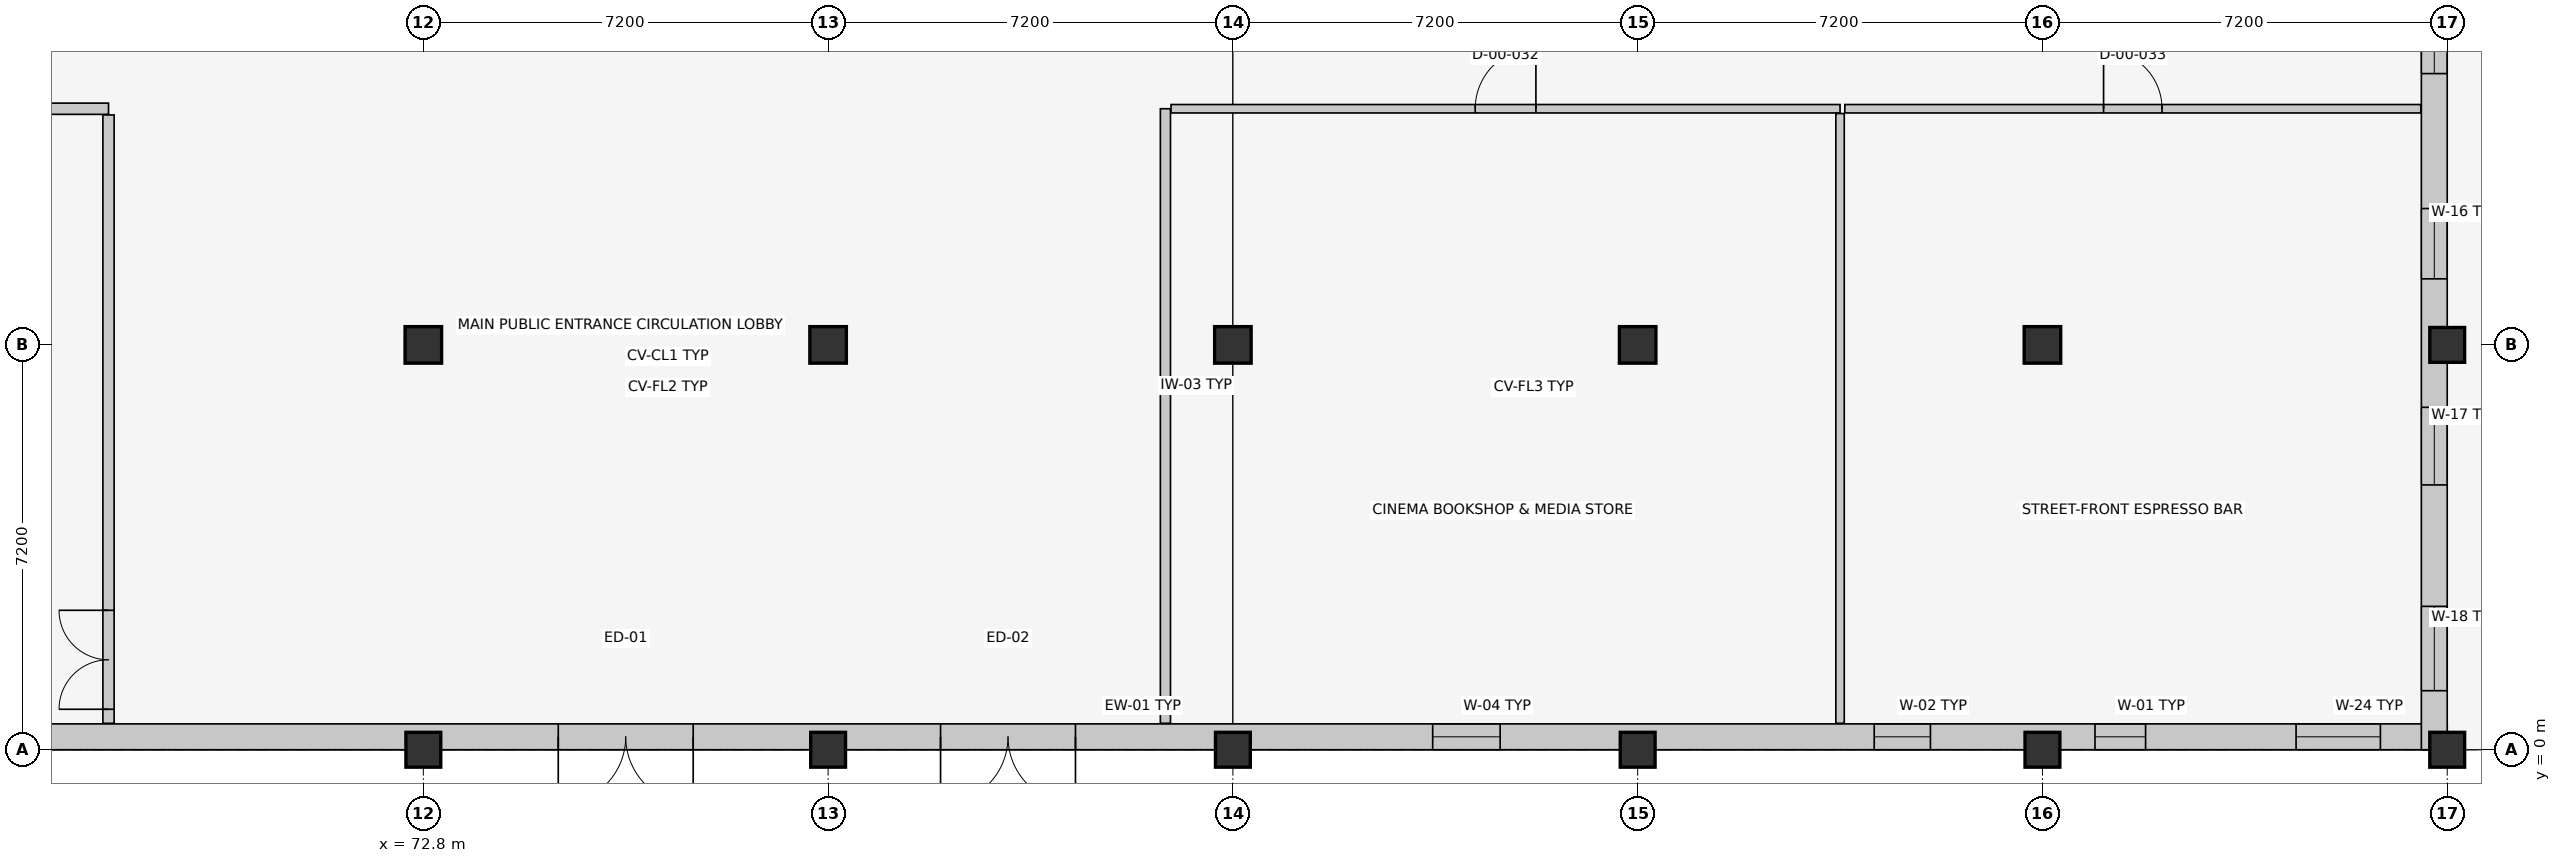
"""IFC4 building model, lengths in metres.
Left out: names, types, materials, properties, quantities, classifications, styles, units other than length and angle.
Written with IfcOpenShell. Run it as: python <this file> out.ifc"""

import sys

from ifc_helpers import new_model, si_unit, direction, frame, frame_2d, origin, origin_2d, place, context, subcontext, project, spatial, rectangle, extrude, element, fill, save


model = new_model("IFC4")
c1 = context("Model", 3, precision=1e-05, world=origin(), true_north=direction((0.0, 1.0)))
c2 = subcontext(c1, "Body", "Model", "MODEL_VIEW")
j1 = project(units=[si_unit("LENGTHUNIT", "METRE"), si_unit("PLANEANGLEUNIT", "RADIAN")], contexts=[c1])
p1 = place(None, origin())
s1 = spatial("IfcSite", under=j1, at=p1, CompositionType="ELEMENT")
p2 = place(p1, origin())
s2 = spatial("IfcBuilding", under=s1, at=p2, CompositionType="ELEMENT")
p3 = place(p2, origin())
s3 = spatial("IfcBuildingStorey", under=s2, at=p3, CompositionType="ELEMENT", Elevation=0.0)
p4 = place(p3, frame((72.8, 0.0, 0.0), z_axis=(0.0, 0.0, 1.0), x_axis=(1.0, 0.0, 0.0)))
e1 = element("IfcColumn", 1, at=p4, inside=s3, PredefinedType="COLUMN", context=c2, shape_type="SweptSolid", body=[
    extrude(rectangle(XDim=0.62, YDim=0.62, at=origin_2d()), origin(), (0.0, 0.0, 1.0), 5.4),
])
p5 = place(p3, frame((72.8, 7.2, 0.0), z_axis=(0.0, 0.0, 1.0), x_axis=(1.0, 0.0, 0.0)))
e2 = element("IfcColumn", 2, at=p5, inside=s3, PredefinedType="COLUMN", context=c2, shape_type="SweptSolid", body=[
    extrude(rectangle(XDim=0.65, YDim=0.65, at=origin_2d()), origin(), (0.0, 0.0, 1.0), 5.4),
])
p6 = place(p3, frame((80.0, 0.0, 0.0), z_axis=(0.0, 0.0, 1.0), x_axis=(1.0, 0.0, 0.0)))
e3 = element("IfcColumn", 3, at=p6, inside=s3, PredefinedType="COLUMN", context=c2, shape_type="SweptSolid", body=[
    extrude(rectangle(XDim=0.62, YDim=0.62, at=origin_2d()), origin(), (0.0, 0.0, 1.0), 5.4),
])
p7 = place(p3, frame((80.0, 7.2, 0.0), z_axis=(0.0, 0.0, 1.0), x_axis=(1.0, 0.0, 0.0)))
e4 = element("IfcColumn", 4, at=p7, inside=s3, PredefinedType="COLUMN", context=c2, shape_type="SweptSolid", body=[
    extrude(rectangle(XDim=0.65, YDim=0.65, at=origin_2d()), origin(), (0.0, 0.0, 1.0), 5.4),
])
p8 = place(p3, frame((87.2, 0.0, 0.0), z_axis=(0.0, 0.0, 1.0), x_axis=(1.0, 0.0, 0.0)))
e5 = element("IfcColumn", 5, at=p8, inside=s3, PredefinedType="COLUMN", context=c2, shape_type="SweptSolid", body=[
    extrude(rectangle(XDim=0.62, YDim=0.62, at=origin_2d()), origin(), (0.0, 0.0, 1.0), 5.4),
])
p9 = place(p3, frame((87.2, 7.2, 0.0), z_axis=(0.0, 0.0, 1.0), x_axis=(1.0, 0.0, 0.0)))
e6 = element("IfcColumn", 6, at=p9, inside=s3, PredefinedType="COLUMN", context=c2, shape_type="SweptSolid", body=[
    extrude(rectangle(XDim=0.65, YDim=0.65, at=origin_2d()), origin(), (0.0, 0.0, 1.0), 5.4),
])
p10 = place(p3, frame((94.4, 0.0, 0.0), z_axis=(0.0, 0.0, 1.0), x_axis=(1.0, 0.0, 0.0)))
e7 = element("IfcColumn", 7, at=p10, inside=s3, PredefinedType="COLUMN", context=c2, shape_type="SweptSolid", body=[
    extrude(rectangle(XDim=0.62, YDim=0.62, at=origin_2d()), origin(), (0.0, 0.0, 1.0), 5.4),
])
p11 = place(p3, frame((94.4, 7.2, 0.0), z_axis=(0.0, 0.0, 1.0), x_axis=(1.0, 0.0, 0.0)))
e8 = element("IfcColumn", 8, at=p11, inside=s3, PredefinedType="COLUMN", context=c2, shape_type="SweptSolid", body=[
    extrude(rectangle(XDim=0.65, YDim=0.65, at=origin_2d()), origin(), (0.0, 0.0, 1.0), 5.4),
])
p12 = place(p3, frame((101.6, 0.0, 0.0), z_axis=(0.0, 0.0, 1.0), x_axis=(1.0, 0.0, 0.0)))
e9 = element("IfcColumn", 9, at=p12, inside=s3, PredefinedType="COLUMN", context=c2, shape_type="SweptSolid", body=[
    extrude(rectangle(XDim=0.62, YDim=0.62, at=origin_2d()), origin(), (0.0, 0.0, 1.0), 5.4),
])
p13 = place(p3, frame((101.6, 7.2, 0.0), z_axis=(0.0, 0.0, 1.0), x_axis=(1.0, 0.0, 0.0)))
e10 = element("IfcColumn", 10, at=p13, inside=s3, PredefinedType="COLUMN", context=c2, shape_type="SweptSolid", body=[
    extrude(rectangle(XDim=0.65, YDim=0.65, at=origin_2d()), origin(), (0.0, 0.0, 1.0), 5.4),
])
for number, where, z_axis, x_axis in (
    (11, (108.8, 0.0, 0.0), (0.0, 0.0, 1.0), (1.0, 0.0, 0.0)),
    (12, (108.8, 7.2, 0.0), (0.0, 0.0, 1.0), (1.0, 0.0, 0.0)),
):
    element("IfcColumn", number, at=place(p3, frame(where, z_axis=z_axis, x_axis=x_axis)), inside=s3, PredefinedType="COLUMN", context=c2, shape_type="SweptSolid", body=[
        extrude(rectangle(XDim=0.62, YDim=0.62, at=origin_2d()), origin(), (0.0, 0.0, 1.0), 5.4),
    ])
p14 = place(p3, frame((108.8, 0.23, 0.0), z_axis=(0.0, 0.0, 1.0), x_axis=(-1.0, 0.0, 0.0)))
e13 = element("IfcWall", 13, at=p14, inside=s3, PredefinedType="SOLIDWALL", context=c2, shape_type="SweptSolid", body=[
    extrude(rectangle(XDim=50.4, YDim=0.46, at=frame_2d((25.2, 0.0))), origin(), (0.0, 0.0, 1.0), 4.445),
])
p15 = place(p14, frame((31.2, 0.0, 0.0)))
e14 = element("IfcOpeningElement", 14, at=p15, cuts=e13, PredefinedType="OPENING", context=c2, shape_type="SweptSolid", body=[
    extrude(rectangle(XDim=2.4, YDim=2.4, at=frame_2d((1.2, 1.2))), frame((0.0, 0.242, 0.0), z_axis=(0.0, -1.0, 0.0), x_axis=(1.0, 0.0, 0.0)), (0.0, 0.0, 1.0), 0.484),
])
p16 = place(p14, frame((24.4, 0.0, 0.0)))
e15 = element("IfcOpeningElement", 15, at=p16, cuts=e13, PredefinedType="OPENING", context=c2, shape_type="SweptSolid", body=[
    extrude(rectangle(XDim=2.4, YDim=2.4, at=frame_2d((1.2, 1.2))), frame((0.0, 0.242, 0.0), z_axis=(0.0, -1.0, 0.0), x_axis=(1.0, 0.0, 0.0)), (0.0, 0.0, 1.0), 0.484),
])
p17 = place(p14, frame((1.188, 0.0, 0.9)))
e16 = element("IfcOpeningElement", 16, at=p17, cuts=e13, PredefinedType="OPENING", context=c2, shape_type="SweptSolid", body=[
    extrude(rectangle(XDim=1.5, YDim=1.75, at=frame_2d((0.75, 0.875))), frame((0.0, 0.242, 0.0), z_axis=(0.0, -1.0, 0.0), x_axis=(1.0, 0.0, 0.0)), (0.0, 0.0, 1.0), 0.484),
])
p18 = place(p14, frame((5.365, 0.0, 0.9)))
e17 = element("IfcOpeningElement", 17, at=p18, cuts=e13, PredefinedType="OPENING", context=c2, shape_type="SweptSolid", body=[
    extrude(rectangle(XDim=0.9, YDim=1.35, at=frame_2d((0.45, 0.675))), frame((0.0, 0.242, 0.0), z_axis=(0.0, -1.0, 0.0), x_axis=(1.0, 0.0, 0.0)), (0.0, 0.0, 1.0), 0.484),
])
p19 = place(p14, frame((9.192, 0.0, 0.9)))
e18 = element("IfcOpeningElement", 18, at=p19, cuts=e13, PredefinedType="OPENING", context=c2, shape_type="SweptSolid", body=[
    extrude(rectangle(XDim=1.0, YDim=1.35, at=frame_2d((0.5, 0.675))), frame((0.0, 0.242, 0.0), z_axis=(0.0, -1.0, 0.0), x_axis=(1.0, 0.0, 0.0)), (0.0, 0.0, 1.0), 0.484),
])
p20 = place(p14, frame((16.846, 0.0, 0.9)))
e19 = element("IfcOpeningElement", 19, at=p20, cuts=e13, PredefinedType="OPENING", context=c2, shape_type="SweptSolid", body=[
    extrude(rectangle(XDim=1.2, YDim=1.35, at=frame_2d((0.6, 0.675))), frame((0.0, 0.242, 0.0), z_axis=(0.0, -1.0, 0.0), x_axis=(1.0, 0.0, 0.0)), (0.0, 0.0, 1.0), 0.484),
])
p21 = place(p14, frame((47.737, 0.0, 0.9)))
e20 = element("IfcOpeningElement", 20, at=p21, cuts=e13, PredefinedType="OPENING", context=c2, shape_type="SweptSolid", body=[
    extrude(rectangle(XDim=1.45, YDim=1.45, at=frame_2d((0.725, 0.725))), frame((0.0, 0.242, 0.0), z_axis=(0.0, -1.0, 0.0), x_axis=(1.0, 0.0, 0.0)), (0.0, 0.0, 1.0), 0.484),
])
p22 = place(p3, frame((108.57, 21.6, 0.0), z_axis=(0.0, 0.0, 1.0), x_axis=(0.0, -1.0, 0.0)))
e21 = element("IfcWall", 21, at=p22, inside=s3, PredefinedType="SOLIDWALL", context=c2, shape_type="SweptSolid", body=[
    extrude(rectangle(XDim=21.6, YDim=0.46, at=frame_2d((10.8, 0.0))), origin(), (0.0, 0.0, 1.0), 4.545),
])
p23 = place(p22, frame((1.35, 0.0, 0.9)))
e22 = element("IfcOpeningElement", 22, at=p23, cuts=e21, PredefinedType="OPENING", context=c2, shape_type="SweptSolid", body=[
    extrude(rectangle(XDim=0.9, YDim=1.6, at=frame_2d((0.45, 0.8))), frame((0.0, 0.242, 0.0), z_axis=(0.0, -1.0, 0.0), x_axis=(1.0, 0.0, 0.0)), (0.0, 0.0, 1.0), 0.484),
])
p24 = place(p22, frame((4.875, 0.0, 0.9)))
e23 = element("IfcOpeningElement", 23, at=p24, cuts=e21, PredefinedType="OPENING", context=c2, shape_type="SweptSolid", body=[
    extrude(rectangle(XDim=1.05, YDim=1.6, at=frame_2d((0.525, 0.8))), frame((0.0, 0.242, 0.0), z_axis=(0.0, -1.0, 0.0), x_axis=(1.0, 0.0, 0.0)), (0.0, 0.0, 1.0), 0.484),
])
p25 = place(p22, frame((8.425, 0.0, 0.9)))
e24 = element("IfcOpeningElement", 24, at=p25, cuts=e21, PredefinedType="OPENING", context=c2, shape_type="SweptSolid", body=[
    extrude(rectangle(XDim=1.15, YDim=1.6, at=frame_2d((0.575, 0.8))), frame((0.0, 0.242, 0.0), z_axis=(0.0, -1.0, 0.0), x_axis=(1.0, 0.0, 0.0)), (0.0, 0.0, 1.0), 0.484),
])
p26 = place(p22, frame((11.975, 0.0, 0.9)))
e25 = element("IfcOpeningElement", 25, at=p26, cuts=e21, PredefinedType="OPENING", context=c2, shape_type="SweptSolid", body=[
    extrude(rectangle(XDim=1.25, YDim=1.6, at=frame_2d((0.625, 0.8))), frame((0.0, 0.242, 0.0), z_axis=(0.0, -1.0, 0.0), x_axis=(1.0, 0.0, 0.0)), (0.0, 0.0, 1.0), 0.484),
])
p27 = place(p22, frame((15.51, 0.0, 0.9)))
e26 = element("IfcOpeningElement", 26, at=p27, cuts=e21, PredefinedType="OPENING", context=c2, shape_type="SweptSolid", body=[
    extrude(rectangle(XDim=1.38, YDim=1.6, at=frame_2d((0.69, 0.8))), frame((0.0, 0.242, 0.0), z_axis=(0.0, -1.0, 0.0), x_axis=(1.0, 0.0, 0.0)), (0.0, 0.0, 1.0), 0.484),
])
p28 = place(p22, frame((19.05, 0.0, 0.9)))
e27 = element("IfcOpeningElement", 27, at=p28, cuts=e21, PredefinedType="OPENING", context=c2, shape_type="SweptSolid", body=[
    extrude(rectangle(XDim=1.5, YDim=1.6, at=frame_2d((0.75, 0.8))), frame((0.0, 0.242, 0.0), z_axis=(0.0, -1.0, 0.0), x_axis=(1.0, 0.0, 0.0)), (0.0, 0.0, 1.0), 0.484),
])
p29 = place(p3, frame((58.87, 11.4, 0.0), z_axis=(0.0, 0.0, 1.0), x_axis=(1.0, 0.0, 0.0)))
e28 = element("IfcWall", 28, at=p29, inside=s3, PredefinedType="PARTITIONING", context=c2, shape_type="SweptSolid", body=[
    extrude(rectangle(XDim=8.33, YDim=0.2, at=frame_2d((4.165, 0.0))), origin(), (0.0, 0.0, 1.0), 5.15),
])
p30 = place(p3, frame((67.2, 0.47, 0.0), z_axis=(0.0, 0.0, 1.0), x_axis=(0.0, 1.0, 0.0)))
e29 = element("IfcWall", 29, at=p30, inside=s3, PredefinedType="PARTITIONING", context=c2, shape_type="SweptSolid", body=[
    extrude(rectangle(XDim=10.82, YDim=0.2, at=frame_2d((5.41, 0.0))), origin(), (0.0, 0.0, 1.0), 5.15),
])
p31 = place(p30, frame((0.25, 0.0, 0.0)))
e30 = element("IfcOpeningElement", 30, at=p31, cuts=e29, PredefinedType="OPENING", context=c2, shape_type="SweptSolid", body=[
    extrude(rectangle(XDim=1.76, YDim=2.3, at=frame_2d((0.88, 1.15))), frame((0.0, 0.112, 0.0), z_axis=(0.0, -1.0, 0.0), x_axis=(1.0, 0.0, 0.0)), (0.0, 0.0, 1.0), 0.224),
])
p32 = place(p3, frame((86.0, 0.47, 0.0), z_axis=(0.0, 0.0, 1.0), x_axis=(0.0, 1.0, 0.0)))
e31 = element("IfcWall", 31, at=p32, inside=s3, PredefinedType="PARTITIONING", context=c2, shape_type="SweptSolid", body=[
    extrude(rectangle(XDim=10.93, YDim=0.18, at=frame_2d((5.465, 0.0))), origin(), (0.0, 0.0, 1.0), 5.15),
])
p33 = place(p3, frame((86.1, 11.4, 0.0), z_axis=(0.0, 0.0, 1.0), x_axis=(1.0, 0.0, 0.0)))
e32 = element("IfcWall", 32, at=p33, inside=s3, PredefinedType="PARTITIONING", context=c2, shape_type="SweptSolid", body=[
    extrude(rectangle(XDim=11.9, YDim=0.15, at=frame_2d((5.95, 0.0))), origin(), (0.0, 0.0, 1.0), 5.15),
])
p34 = place(p33, frame((5.41, 0.0, 0.0)))
e33 = element("IfcOpeningElement", 33, at=p34, cuts=e32, PredefinedType="OPENING", context=c2, shape_type="SweptSolid", body=[
    extrude(rectangle(XDim=1.08, YDim=2.15, at=frame_2d((0.54, 1.075))), frame((0.0, 0.087, 0.0), z_axis=(0.0, -1.0, 0.0), x_axis=(1.0, 0.0, 0.0)), (0.0, 0.0, 1.0), 0.174),
])
p35 = place(p3, frame((98.0, 0.47, 0.0), z_axis=(0.0, 0.0, 1.0), x_axis=(0.0, 1.0, 0.0)))
e34 = element("IfcWall", 34, at=p35, inside=s3, PredefinedType="PARTITIONING", context=c2, shape_type="SweptSolid", body=[
    extrude(rectangle(XDim=10.845, YDim=0.15, at=frame_2d((5.422, 0.0))), origin(), (0.0, 0.0, 1.0), 4.575),
])
p36 = place(p3, frame((98.085, 11.4, 0.0), z_axis=(0.0, 0.0, 1.0), x_axis=(1.0, 0.0, 0.0)))
e35 = element("IfcWall", 35, at=p36, inside=s3, PredefinedType="PARTITIONING", context=c2, shape_type="SweptSolid", body=[
    extrude(rectangle(XDim=10.245, YDim=0.15, at=frame_2d((5.123, 0.0))), origin(), (0.0, 0.0, 1.0), 5.15),
])
p37 = place(p36, frame((4.603, 0.0, 0.0)))
e36 = element("IfcOpeningElement", 36, at=p37, cuts=e35, PredefinedType="OPENING", context=c2, shape_type="SweptSolid", body=[
    extrude(rectangle(XDim=1.04, YDim=2.15, at=frame_2d((0.52, 1.075))), frame((0.0, 0.087, 0.0), z_axis=(0.0, -1.0, 0.0), x_axis=(1.0, 0.0, 0.0)), (0.0, 0.0, 1.0), 0.174),
])
p38 = place(p15, origin())
e37 = element("IfcDoor", 37, at=p38, inside=s3, OperationType="DOUBLE_DOOR_SINGLE_SWING", PredefinedType="DOOR", context=c2, shape_type="SweptSolid", body=[
    extrude(rectangle(XDim=2.4, YDim=2.4, at=frame_2d((1.2, 1.2))), frame((0.0, 0.025, 0.0), z_axis=(0.0, -1.0, 0.0), x_axis=(1.0, 0.0, 0.0)), (0.0, 0.0, 1.0), 0.05),
])
fill(e14, e37)
p39 = place(p16, origin())
e38 = element("IfcDoor", 38, at=p39, inside=s3, OperationType="DOUBLE_DOOR_SINGLE_SWING", PredefinedType="DOOR", context=c2, shape_type="SweptSolid", body=[
    extrude(rectangle(XDim=2.4, YDim=2.4, at=frame_2d((1.2, 1.2))), frame((0.0, 0.025, 0.0), z_axis=(0.0, -1.0, 0.0), x_axis=(1.0, 0.0, 0.0)), (0.0, 0.0, 1.0), 0.05),
])
fill(e15, e38)
p40 = place(p17, origin())
e39 = element("IfcWindow", 39, at=p40, inside=s3, PartitioningType="SINGLE_PANEL", PredefinedType="WINDOW", context=c2, shape_type="SweptSolid", body=[
    extrude(rectangle(XDim=1.5, YDim=1.75, at=frame_2d((0.75, 0.875))), frame((0.0, 0.03, 0.0), z_axis=(0.0, -1.0, 0.0), x_axis=(1.0, 0.0, 0.0)), (0.0, 0.0, 1.0), 0.06),
])
fill(e16, e39)
p41 = place(p18, origin())
e40 = element("IfcWindow", 40, at=p41, inside=s3, PartitioningType="SINGLE_PANEL", PredefinedType="WINDOW", context=c2, shape_type="SweptSolid", body=[
    extrude(rectangle(XDim=0.9, YDim=1.35, at=frame_2d((0.45, 0.675))), frame((0.0, 0.03, 0.0), z_axis=(0.0, -1.0, 0.0), x_axis=(1.0, 0.0, 0.0)), (0.0, 0.0, 1.0), 0.06),
])
fill(e17, e40)
p42 = place(p19, origin())
e41 = element("IfcWindow", 41, at=p42, inside=s3, PartitioningType="SINGLE_PANEL", PredefinedType="WINDOW", context=c2, shape_type="SweptSolid", body=[
    extrude(rectangle(XDim=1.0, YDim=1.35, at=frame_2d((0.5, 0.675))), frame((0.0, 0.03, 0.0), z_axis=(0.0, -1.0, 0.0), x_axis=(1.0, 0.0, 0.0)), (0.0, 0.0, 1.0), 0.06),
])
fill(e18, e41)
p43 = place(p20, origin())
e42 = element("IfcWindow", 42, at=p43, inside=s3, PartitioningType="SINGLE_PANEL", PredefinedType="WINDOW", context=c2, shape_type="SweptSolid", body=[
    extrude(rectangle(XDim=1.2, YDim=1.35, at=frame_2d((0.6, 0.675))), frame((0.0, 0.03, 0.0), z_axis=(0.0, -1.0, 0.0), x_axis=(1.0, 0.0, 0.0)), (0.0, 0.0, 1.0), 0.06),
])
fill(e19, e42)
p44 = place(p25, origin())
e43 = element("IfcWindow", 43, at=p44, inside=s3, PartitioningType="SINGLE_PANEL", PredefinedType="WINDOW", context=c2, shape_type="SweptSolid", body=[
    extrude(rectangle(XDim=1.15, YDim=1.6, at=frame_2d((0.575, 0.8))), frame((0.0, 0.03, 0.0), z_axis=(0.0, -1.0, 0.0), x_axis=(1.0, 0.0, 0.0)), (0.0, 0.0, 1.0), 0.06),
])
fill(e24, e43)
p45 = place(p26, origin())
e44 = element("IfcWindow", 44, at=p45, inside=s3, PartitioningType="SINGLE_PANEL", PredefinedType="WINDOW", context=c2, shape_type="SweptSolid", body=[
    extrude(rectangle(XDim=1.25, YDim=1.6, at=frame_2d((0.625, 0.8))), frame((0.0, 0.03, 0.0), z_axis=(0.0, -1.0, 0.0), x_axis=(1.0, 0.0, 0.0)), (0.0, 0.0, 1.0), 0.06),
])
fill(e25, e44)
p46 = place(p27, origin())
e45 = element("IfcWindow", 45, at=p46, inside=s3, PartitioningType="SINGLE_PANEL", PredefinedType="WINDOW", context=c2, shape_type="SweptSolid", body=[
    extrude(rectangle(XDim=1.38, YDim=1.6, at=frame_2d((0.69, 0.8))), frame((0.0, 0.03, 0.0), z_axis=(0.0, -1.0, 0.0), x_axis=(1.0, 0.0, 0.0)), (0.0, 0.0, 1.0), 0.06),
])
fill(e26, e45)
p47 = place(p28, origin())
e46 = element("IfcWindow", 46, at=p47, inside=s3, PartitioningType="SINGLE_PANEL", PredefinedType="WINDOW", context=c2, shape_type="SweptSolid", body=[
    extrude(rectangle(XDim=1.5, YDim=1.6, at=frame_2d((0.75, 0.8))), frame((0.0, 0.03, 0.0), z_axis=(0.0, -1.0, 0.0), x_axis=(1.0, 0.0, 0.0)), (0.0, 0.0, 1.0), 0.06),
])
fill(e27, e46)
p48 = place(p31, origin())
e47 = element("IfcDoor", 47, at=p48, inside=s3, OperationType="DOUBLE_DOOR_SINGLE_SWING", PredefinedType="DOOR", context=c2, shape_type="SweptSolid", body=[
    extrude(rectangle(XDim=1.76, YDim=2.3, at=frame_2d((0.88, 1.15))), frame((0.0, 0.025, 0.0), z_axis=(0.0, -1.0, 0.0), x_axis=(1.0, 0.0, 0.0)), (0.0, 0.0, 1.0), 0.05),
])
fill(e30, e47)
p49 = place(p34, origin())
e48 = element("IfcDoor", 48, at=p49, inside=s3, OperationType="SINGLE_SWING_RIGHT", PredefinedType="DOOR", context=c2, shape_type="SweptSolid", body=[
    extrude(rectangle(XDim=1.08, YDim=2.15, at=frame_2d((0.54, 1.075))), frame((0.0, 0.025, 0.0), z_axis=(0.0, -1.0, 0.0), x_axis=(1.0, 0.0, 0.0)), (0.0, 0.0, 1.0), 0.05),
])
fill(e33, e48)
p50 = place(p37, origin())
e49 = element("IfcDoor", 49, at=p50, inside=s3, OperationType="SINGLE_SWING_LEFT", PredefinedType="DOOR", context=c2, shape_type="SweptSolid", body=[
    extrude(rectangle(XDim=1.04, YDim=2.15, at=frame_2d((0.52, 1.075))), frame((0.0, 0.025, 0.0), z_axis=(0.0, -1.0, 0.0), x_axis=(1.0, 0.0, 0.0)), (0.0, 0.0, 1.0), 0.05),
])
fill(e36, e49)
save(model, sys.argv[1])
